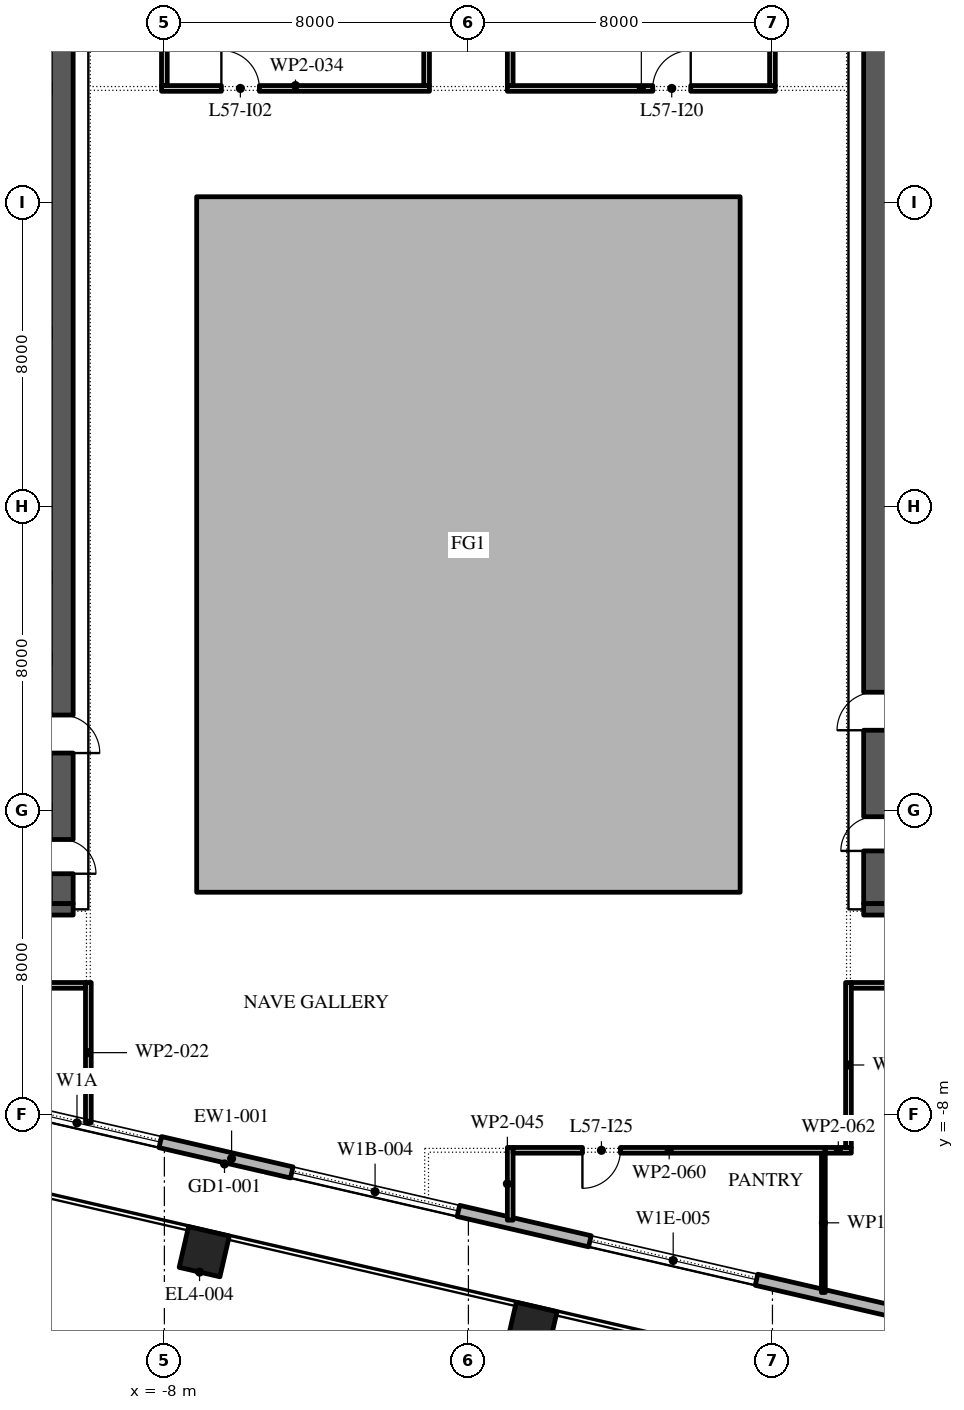
"""IFC4 building model, lengths in metres.
Left out: names, types, materials, properties, quantities, classifications, styles, units other than length and angle.
Written with IfcOpenShell. Run it as: python <this file> out.ifc"""

import sys

from ifc_helpers import new_model, si_unit, direction, frame, frame_2d, origin, origin_2d, place, context, subcontext, project, spatial, polyline, rectangle, outline, extrude, element, fill, save


model = new_model("IFC4")
c1 = context("Model", 3, precision=1e-05, world=origin(), true_north=direction((0.0, 1.0)))
c2 = subcontext(c1, "Body", "Model", "MODEL_VIEW")
j1 = project(units=[si_unit("LENGTHUNIT", "METRE"), si_unit("PLANEANGLEUNIT", "RADIAN")], contexts=[c1])
p1 = place(None, origin())
s1 = spatial("IfcSite", under=j1, at=p1, CompositionType="ELEMENT")
p2 = place(p1, origin())
s2 = spatial("IfcBuilding", under=s1, at=p2, CompositionType="ELEMENT")
p3 = place(p2, frame((0.0, 0.0, 264.0)))
s3 = spatial("IfcBuildingStorey", under=s2, at=p3, CompositionType="ELEMENT", Elevation=264.0)
for number, where, z_axis, x_axis in (
    (1, (-6.951, -11.608, 0.0), (0.0, 0.0, 1.0), (0.974, -0.225, 0.0)),
    (2, (1.672, -13.599, 0.0), (0.0, 0.0, 1.0), (0.974, -0.225, 0.0)),
):
    element("IfcColumn", number, at=place(p3, frame(where, z_axis=z_axis, x_axis=x_axis)), inside=s3, PredefinedType="COLUMN", context=c2, shape_type="SweptSolid", body=[
        extrude(rectangle(XDim=1.1, YDim=1.1, at=origin_2d()), origin(), (0.0, 0.0, 1.0), 4.2),
    ])
p4 = place(p3, origin())
e3 = element("IfcWall", 3, at=p4, inside=s3, PredefinedType="STANDARD", context=c2, shape_type="SweptSolid", body=[
    extrude(outline(polyline([(-7.15, -2.15), (7.15, -2.15), (7.15, 16.15), (-7.15, 16.15), (-7.15, -2.15)]), holes=[polyline([(-7.0, -2.0), (-7.0, 16.0), (7.0, 16.0), (7.0, -2.0), (-7.0, -2.0)])]), origin(), (0.0, 0.0, 1.0), 4.0),
])
p5 = place(p3, frame((-29.616, -3.758, 0.0), z_axis=(0.0, 0.0, 1.0), x_axis=(0.974370532314, -0.224949029246, 0.0)))
e4 = element("IfcWall", 4, at=p5, inside=s3, PredefinedType="STANDARD", context=c2, shape_type="SweptSolid", body=[
    extrude(rectangle(XDim=48.0, YDim=0.3, at=frame_2d((24.0, 0.0))), origin(), (0.0, 0.0, 1.0), 4.0),
])
p6 = place(p5, frame((1.625, 0.0, 0.45)))
e5 = element("IfcOpeningElement", 5, at=p6, cuts=e4, PredefinedType="OPENING", context=c2, shape_type="SweptSolid", body=[
    extrude(rectangle(XDim=4.5, YDim=3.05, at=frame_2d((2.25, 1.525))), frame((0.0, 0.16, 0.0), z_axis=(0.0, -1.0, 0.0), x_axis=(1.0, 0.0, 0.0)), (0.0, 0.0, 1.0), 0.32),
])
p7 = place(p5, frame((10.575, 0.0, 0.0)))
e6 = element("IfcOpeningElement", 6, at=p7, cuts=e4, PredefinedType="OPENING", context=c2, shape_type="SweptSolid", body=[
    extrude(rectangle(XDim=2.4, YDim=3.5, at=frame_2d((1.2, 1.75))), frame((0.0, 0.16, 0.0), z_axis=(0.0, -1.0, 0.0), x_axis=(1.0, 0.0, 0.0)), (0.0, 0.0, 1.0), 0.32),
])
p8 = place(p5, frame((17.575, 0.0, 0.45)))
e7 = element("IfcOpeningElement", 7, at=p8, cuts=e4, PredefinedType="OPENING", context=c2, shape_type="SweptSolid", body=[
    extrude(rectangle(XDim=4.5, YDim=3.0, at=frame_2d((2.25, 1.5))), frame((0.0, 0.16, 0.0), z_axis=(0.0, -1.0, 0.0), x_axis=(1.0, 0.0, 0.0)), (0.0, 0.0, 1.0), 0.32),
])
p9 = place(p5, frame((25.625, 0.0, 0.45)))
e8 = element("IfcOpeningElement", 8, at=p9, cuts=e4, PredefinedType="OPENING", context=c2, shape_type="SweptSolid", body=[
    extrude(rectangle(XDim=4.5, YDim=2.95, at=frame_2d((2.25, 1.475))), frame((0.0, 0.16, 0.0), z_axis=(0.0, -1.0, 0.0), x_axis=(1.0, 0.0, 0.0)), (0.0, 0.0, 1.0), 0.32),
])
p10 = place(p5, frame((33.675, 0.0, 0.45)))
e9 = element("IfcOpeningElement", 9, at=p10, cuts=e4, PredefinedType="OPENING", context=c2, shape_type="SweptSolid", body=[
    extrude(rectangle(XDim=4.5, YDim=2.825, at=frame_2d((2.25, 1.413))), frame((0.0, 0.16, 0.0), z_axis=(0.0, -1.0, 0.0), x_axis=(1.0, 0.0, 0.0)), (0.0, 0.0, 1.0), 0.32),
])
p11 = place(p5, frame((42.775, 0.0, 0.0)))
e10 = element("IfcOpeningElement", 10, at=p11, cuts=e4, PredefinedType="OPENING", context=c2, shape_type="SweptSolid", body=[
    extrude(rectangle(XDim=2.4, YDim=3.5, at=frame_2d((1.2, 1.75))), frame((0.0, 0.16, 0.0), z_axis=(0.0, -1.0, 0.0), x_axis=(1.0, 0.0, 0.0)), (0.0, 0.0, 1.0), 0.32),
])
p12 = place(p3, frame((-10.7, -2.45, 0.0), z_axis=(0.0, 0.0, 1.0), x_axis=(0.0, 1.0, 0.0)))
e11 = element("IfcWall", 11, at=p12, inside=s3, PredefinedType="SHEAR", context=c2, shape_type="SweptSolid", body=[
    extrude(rectangle(XDim=27.9, YDim=0.6, at=frame_2d((13.95, 0.0))), origin(), (0.0, 0.0, 1.0), 4.0),
])
p13 = place(p12, frame((23.65, 0.0, 0.0)))
e12 = element("IfcOpeningElement", 12, at=p13, cuts=e11, PredefinedType="OPENING", context=c2, shape_type="SweptSolid", body=[
    extrude(rectangle(XDim=2.4, YDim=2.1, at=frame_2d((1.2, 1.05))), frame((0.0, 0.31, 0.0), z_axis=(0.0, -1.0, 0.0), x_axis=(1.0, 0.0, 0.0)), (0.0, 0.0, 1.0), 0.62),
])
p14 = place(p12, frame((0.788, 0.0, 0.0)))
e13 = element("IfcOpeningElement", 13, at=p14, cuts=e11, PredefinedType="OPENING", context=c2, shape_type="SweptSolid", body=[
    extrude(rectangle(XDim=0.9, YDim=2.1, at=frame_2d((0.45, 1.05))), frame((0.0, 0.31, 0.0), z_axis=(0.0, -1.0, 0.0), x_axis=(1.0, 0.0, 0.0)), (0.0, 0.0, 1.0), 0.62),
])
p15 = place(p12, frame((3.962, 0.0, 0.0)))
e14 = element("IfcOpeningElement", 14, at=p15, cuts=e11, PredefinedType="OPENING", context=c2, shape_type="SweptSolid", body=[
    extrude(rectangle(XDim=1.0, YDim=2.1, at=frame_2d((0.5, 1.05))), frame((0.0, 0.31, 0.0), z_axis=(0.0, -1.0, 0.0), x_axis=(1.0, 0.0, 0.0)), (0.0, 0.0, 1.0), 0.62),
])
p16 = place(p3, frame((-21.6, -2.6, 0.0), z_axis=(0.0, 0.0, 1.0), x_axis=(1.0, 0.0, 0.0)))
e15 = element("IfcWall", 15, at=p16, inside=s3, PredefinedType="SHEAR", context=c2, shape_type="SweptSolid", body=[
    extrude(rectangle(XDim=11.2, YDim=0.3, at=frame_2d((5.6, 0.0))), origin(), (0.0, 0.0, 1.0), 4.0),
])
p17 = place(p3, frame((10.7, -2.45, 0.0), z_axis=(0.0, 0.0, 1.0), x_axis=(0.0, 1.0, 0.0)))
e16 = element("IfcWall", 16, at=p17, inside=s3, PredefinedType="SHEAR", context=c2, shape_type="SweptSolid", body=[
    extrude(rectangle(XDim=27.9, YDim=0.6, at=frame_2d((13.95, 0.0))), origin(), (0.0, 0.0, 1.0), 4.0),
])
p18 = place(p17, frame((23.65, 0.0, 0.0)))
e17 = element("IfcOpeningElement", 17, at=p18, cuts=e16, PredefinedType="OPENING", context=c2, shape_type="SweptSolid", body=[
    extrude(rectangle(XDim=2.4, YDim=2.1, at=frame_2d((1.2, 1.05))), frame((0.0, 0.31, 0.0), z_axis=(0.0, -1.0, 0.0), x_axis=(1.0, 0.0, 0.0)), (0.0, 0.0, 1.0), 0.62),
])
p19 = place(p17, frame((1.387, 0.0, 0.0)))
e18 = element("IfcOpeningElement", 18, at=p19, cuts=e16, PredefinedType="OPENING", context=c2, shape_type="SweptSolid", body=[
    extrude(rectangle(XDim=0.9, YDim=2.1, at=frame_2d((0.45, 1.05))), frame((0.0, 0.31, 0.0), z_axis=(0.0, -1.0, 0.0), x_axis=(1.0, 0.0, 0.0)), (0.0, 0.0, 1.0), 0.62),
])
p20 = place(p17, frame((4.562, 0.0, 0.0)))
e19 = element("IfcOpeningElement", 19, at=p20, cuts=e16, PredefinedType="OPENING", context=c2, shape_type="SweptSolid", body=[
    extrude(rectangle(XDim=1.0, YDim=2.1, at=frame_2d((0.5, 1.05))), frame((0.0, 0.31, 0.0), z_axis=(0.0, -1.0, 0.0), x_axis=(1.0, 0.0, 0.0)), (0.0, 0.0, 1.0), 0.62),
])
p21 = place(p3, frame((10.4, -2.6, 0.0), z_axis=(0.0, 0.0, 1.0), x_axis=(1.0, 0.0, 0.0)))
e20 = element("IfcWall", 20, at=p21, inside=s3, PredefinedType="SHEAR", context=c2, shape_type="SweptSolid", body=[
    extrude(rectangle(XDim=11.2, YDim=0.3, at=frame_2d((5.6, 0.0))), origin(), (0.0, 0.0, 1.0), 4.0),
])
p22 = place(p3, frame((-10.0, -8.216, 0.0), z_axis=(0.0, 0.0, 1.0), x_axis=(0.0, 1.0, 0.0)))
e21 = element("IfcWall", 21, at=p22, inside=s3, PredefinedType="PARTITIONING", context=c2, shape_type="SweptSolid", body=[
    extrude(rectangle(XDim=3.691, YDim=0.15, at=frame_2d((1.846, 0.0))), origin(), (0.0, 0.0, 1.0), 4.0),
])
p23 = place(p3, frame((-10.075, -4.6, 0.0), z_axis=(0.0, 0.0, 1.0), x_axis=(-1.0, 0.0, 0.0)))
e22 = element("IfcWall", 22, at=p23, inside=s3, PredefinedType="PARTITIONING", context=c2, shape_type="SweptSolid", body=[
    extrude(rectangle(XDim=11.88, YDim=0.15, at=frame_2d((5.94, 0.0))), origin(), (0.0, 0.0, 1.0), 4.0),
])
p24 = place(p23, frame((3.055, 0.0, 0.0)))
e23 = element("IfcOpeningElement", 23, at=p24, cuts=e22, PredefinedType="OPENING", context=c2, shape_type="SweptSolid", body=[
    extrude(rectangle(XDim=1.0, YDim=2.1, at=frame_2d((0.5, 1.05))), frame((0.0, 0.085, 0.0), z_axis=(0.0, -1.0, 0.0), x_axis=(1.0, 0.0, 0.0)), (0.0, 0.0, 1.0), 0.17),
])
p25 = place(p3, frame((-8.075, 19.0, 0.0), z_axis=(0.0, 0.0, 1.0), x_axis=(1.0, 0.0, 0.0)))
e24 = element("IfcWall", 24, at=p25, inside=s3, PredefinedType="PARTITIONING", context=c2, shape_type="SweptSolid", body=[
    extrude(rectangle(XDim=7.05, YDim=0.15, at=frame_2d((3.525, 0.0))), origin(), (0.0, 0.0, 1.0), 4.0),
])
p26 = place(p25, frame((1.575, 0.0, 0.0)))
e25 = element("IfcOpeningElement", 25, at=p26, cuts=e24, PredefinedType="OPENING", context=c2, shape_type="SweptSolid", body=[
    extrude(rectangle(XDim=1.0, YDim=2.1, at=frame_2d((0.5, 1.05))), frame((0.0, 0.085, 0.0), z_axis=(0.0, -1.0, 0.0), x_axis=(1.0, 0.0, 0.0)), (0.0, 0.0, 1.0), 0.17),
])
p27 = place(p3, frame((-8.0, 22.72, 0.0), z_axis=(0.0, 0.0, 1.0), x_axis=(0.0, -1.0, 0.0)))
e26 = element("IfcWall", 26, at=p27, inside=s3, PredefinedType="PARTITIONING", context=c2, shape_type="SweptSolid", body=[
    extrude(rectangle(XDim=3.645, YDim=0.15, at=frame_2d((1.823, 0.0))), origin(), (0.0, 0.0, 1.0), 4.0),
])
p28 = place(p3, frame((-1.1, 19.075, 0.0), z_axis=(0.0, 0.0, 1.0), x_axis=(0.0, 1.0, 0.0)))
e27 = element("IfcWall", 27, at=p28, inside=s3, PredefinedType="PARTITIONING", context=c2, shape_type="SweptSolid", body=[
    extrude(rectangle(XDim=3.595, YDim=0.15, at=frame_2d((1.797, 0.0))), origin(), (0.0, 0.0, 1.0), 4.0),
])
p29 = place(p3, frame((1.1, -8.865, 0.0), z_axis=(0.0, 0.0, 1.0), x_axis=(0.0, -1.0, 0.0)))
e28 = element("IfcWall", 28, at=p29, inside=s3, PredefinedType="PARTITIONING", context=c2, shape_type="SweptSolid", body=[
    extrude(rectangle(XDim=1.913, YDim=0.15, at=frame_2d((0.957, 0.0))), origin(), (0.0, 0.0, 1.0), 4.0),
])
p30 = place(p3, frame((1.025, 19.0, 0.0), z_axis=(0.0, 0.0, 1.0), x_axis=(1.0, 0.0, 0.0)))
e29 = element("IfcWall", 29, at=p30, inside=s3, PredefinedType="PARTITIONING", context=c2, shape_type="SweptSolid", body=[
    extrude(rectangle(XDim=7.05, YDim=0.15, at=frame_2d((3.525, 0.0))), origin(), (0.0, 0.0, 1.0), 4.0),
])
p31 = place(p30, frame((3.825, 0.0, 0.0)))
e30 = element("IfcOpeningElement", 30, at=p31, cuts=e29, PredefinedType="OPENING", context=c2, shape_type="SweptSolid", body=[
    extrude(rectangle(XDim=1.0, YDim=2.1, at=frame_2d((0.5, 1.05))), frame((0.0, 0.085, 0.0), z_axis=(0.0, -1.0, 0.0), x_axis=(1.0, 0.0, 0.0)), (0.0, 0.0, 1.0), 0.17),
])
p32 = place(p3, frame((1.1, 24.0, 0.0), z_axis=(0.0, 0.0, 1.0), x_axis=(0.0, -1.0, 0.0)))
e31 = element("IfcWall", 31, at=p32, inside=s3, PredefinedType="PARTITIONING", context=c2, shape_type="SweptSolid", body=[
    extrude(rectangle(XDim=4.925, YDim=0.15, at=frame_2d((2.462, 0.0))), origin(), (0.0, 0.0, 1.0), 4.0),
])
p33 = place(p3, frame((8.0, 19.075, 0.0), z_axis=(0.0, 0.0, 1.0), x_axis=(0.0, 1.0, 0.0)))
e32 = element("IfcWall", 32, at=p33, inside=s3, PredefinedType="PARTITIONING", context=c2, shape_type="SweptSolid", body=[
    extrude(rectangle(XDim=4.875, YDim=0.15, at=frame_2d((2.438, 0.0))), origin(), (0.0, 0.0, 1.0), 4.0),
])
p34 = place(p3, frame((9.39, -8.94, 0.0), z_axis=(0.0, 0.0, 1.0), x_axis=(-1.0, 0.0, 0.0)))
e33 = element("IfcWall", 33, at=p34, inside=s3, PredefinedType="PARTITIONING", context=c2, shape_type="SweptSolid", body=[
    extrude(rectangle(XDim=8.215, YDim=0.15, at=frame_2d((4.107, 0.0))), origin(), (0.0, 0.0, 1.0), 4.0),
])
p35 = place(p34, frame((5.39, 0.0, 0.0)))
e34 = element("IfcOpeningElement", 34, at=p35, cuts=e33, PredefinedType="OPENING", context=c2, shape_type="SweptSolid", body=[
    extrude(rectangle(XDim=1.0, YDim=2.1, at=frame_2d((0.5, 1.05))), frame((0.0, 0.085, 0.0), z_axis=(0.0, -1.0, 0.0), x_axis=(1.0, 0.0, 0.0)), (0.0, 0.0, 1.0), 0.17),
])
p36 = place(p3, frame((9.34, -9.015, 0.0), z_axis=(0.0, 0.0, 1.0), x_axis=(0.0, -1.0, 0.0)))
e35 = element("IfcWall", 35, at=p36, inside=s3, PredefinedType="PARTITIONING", context=c2, shape_type="SweptSolid", body=[
    extrude(rectangle(XDim=3.666, YDim=0.1, at=frame_2d((1.833, 0.0))), origin(), (0.0, 0.0, 1.0), 4.0),
])
p37 = place(p3, frame((10.075, -8.94, 0.0), z_axis=(0.0, 0.0, 1.0), x_axis=(-1.0, 0.0, 0.0)))
e36 = element("IfcWall", 36, at=p37, inside=s3, PredefinedType="PARTITIONING", context=c2, shape_type="SweptSolid", body=[
    extrude(rectangle(XDim=0.685, YDim=0.15, at=frame_2d((0.343, 0.0))), origin(), (0.0, 0.0, 1.0), 4.0),
])
p38 = place(p3, frame((10.0, -4.525, 0.0), z_axis=(0.0, 0.0, 1.0), x_axis=(0.0, -1.0, 0.0)))
e37 = element("IfcWall", 37, at=p38, inside=s3, PredefinedType="PARTITIONING", context=c2, shape_type="SweptSolid", body=[
    extrude(rectangle(XDim=4.34, YDim=0.15, at=frame_2d((2.17, 0.0))), origin(), (0.0, 0.0, 1.0), 4.0),
])
p39 = place(p3, frame((17.24, -4.6, 0.0), z_axis=(0.0, 0.0, 1.0), x_axis=(-1.0, 0.0, 0.0)))
e38 = element("IfcWall", 38, at=p39, inside=s3, PredefinedType="PARTITIONING", context=c2, shape_type="SweptSolid", body=[
    extrude(rectangle(XDim=7.165, YDim=0.15, at=frame_2d((3.583, 0.0))), origin(), (0.0, 0.0, 1.0), 4.0),
])
p40 = place(p39, frame((4.59, 0.0, 0.0)))
e39 = element("IfcOpeningElement", 39, at=p40, cuts=e38, PredefinedType="OPENING", context=c2, shape_type="SweptSolid", body=[
    extrude(rectangle(XDim=1.0, YDim=2.1, at=frame_2d((0.5, 1.05))), frame((0.0, 0.085, 0.0), z_axis=(0.0, -1.0, 0.0), x_axis=(1.0, 0.0, 0.0)), (0.0, 0.0, 1.0), 0.17),
])
p41 = place(p8, origin())
e40 = element("IfcWindow", 40, at=p41, inside=s3, PartitioningType="DOUBLE_PANEL_VERTICAL", PredefinedType="WINDOW", context=c2, shape_type="SweptSolid", body=[
    extrude(rectangle(XDim=4.5, YDim=3.0, at=frame_2d((2.25, 1.5))), frame((0.0, 0.03, 0.0), z_axis=(0.0, -1.0, 0.0), x_axis=(1.0, 0.0, 0.0)), (0.0, 0.0, 1.0), 0.06),
])
fill(e7, e40)
p42 = place(p9, origin())
e41 = element("IfcWindow", 41, at=p42, inside=s3, PartitioningType="DOUBLE_PANEL_VERTICAL", PredefinedType="WINDOW", context=c2, shape_type="SweptSolid", body=[
    extrude(rectangle(XDim=4.5, YDim=2.95, at=frame_2d((2.25, 1.475))), frame((0.0, 0.03, 0.0), z_axis=(0.0, -1.0, 0.0), x_axis=(1.0, 0.0, 0.0)), (0.0, 0.0, 1.0), 0.06),
])
fill(e8, e41)
p43 = place(p10, origin())
e42 = element("IfcWindow", 42, at=p43, inside=s3, PartitioningType="DOUBLE_PANEL_VERTICAL", PredefinedType="WINDOW", context=c2, shape_type="SweptSolid", body=[
    extrude(rectangle(XDim=4.5, YDim=2.825, at=frame_2d((2.25, 1.413))), frame((0.0, 0.03, 0.0), z_axis=(0.0, -1.0, 0.0), x_axis=(1.0, 0.0, 0.0)), (0.0, 0.0, 1.0), 0.06),
])
fill(e9, e42)
p44 = place(p26, origin())
e43 = element("IfcDoor", 43, at=p44, inside=s3, OperationType="SINGLE_SWING_RIGHT", PredefinedType="DOOR", context=c2, shape_type="SweptSolid", body=[
    extrude(rectangle(XDim=1.0, YDim=2.1, at=frame_2d((0.5, 1.05))), frame((0.0, 0.025, 0.0), z_axis=(0.0, -1.0, 0.0), x_axis=(1.0, 0.0, 0.0)), (0.0, 0.0, 1.0), 0.05),
])
fill(e25, e43)
p45 = place(p31, origin())
e44 = element("IfcDoor", 44, at=p45, inside=s3, OperationType="SINGLE_SWING_LEFT", PredefinedType="DOOR", context=c2, shape_type="SweptSolid", body=[
    extrude(rectangle(XDim=1.0, YDim=2.1, at=frame_2d((0.5, 1.05))), frame((0.0, 0.025, 0.0), z_axis=(0.0, -1.0, 0.0), x_axis=(1.0, 0.0, 0.0)), (0.0, 0.0, 1.0), 0.05),
])
fill(e30, e44)
p46 = place(p35, origin())
e45 = element("IfcDoor", 45, at=p46, inside=s3, OperationType="SINGLE_SWING_LEFT", PredefinedType="DOOR", context=c2, shape_type="SweptSolid", body=[
    extrude(rectangle(XDim=1.0, YDim=2.1, at=frame_2d((0.5, 1.05))), frame((0.0, 0.025, 0.0), z_axis=(0.0, -1.0, 0.0), x_axis=(1.0, 0.0, 0.0)), (0.0, 0.0, 1.0), 0.05),
])
fill(e34, e45)
save(model, sys.argv[1])
